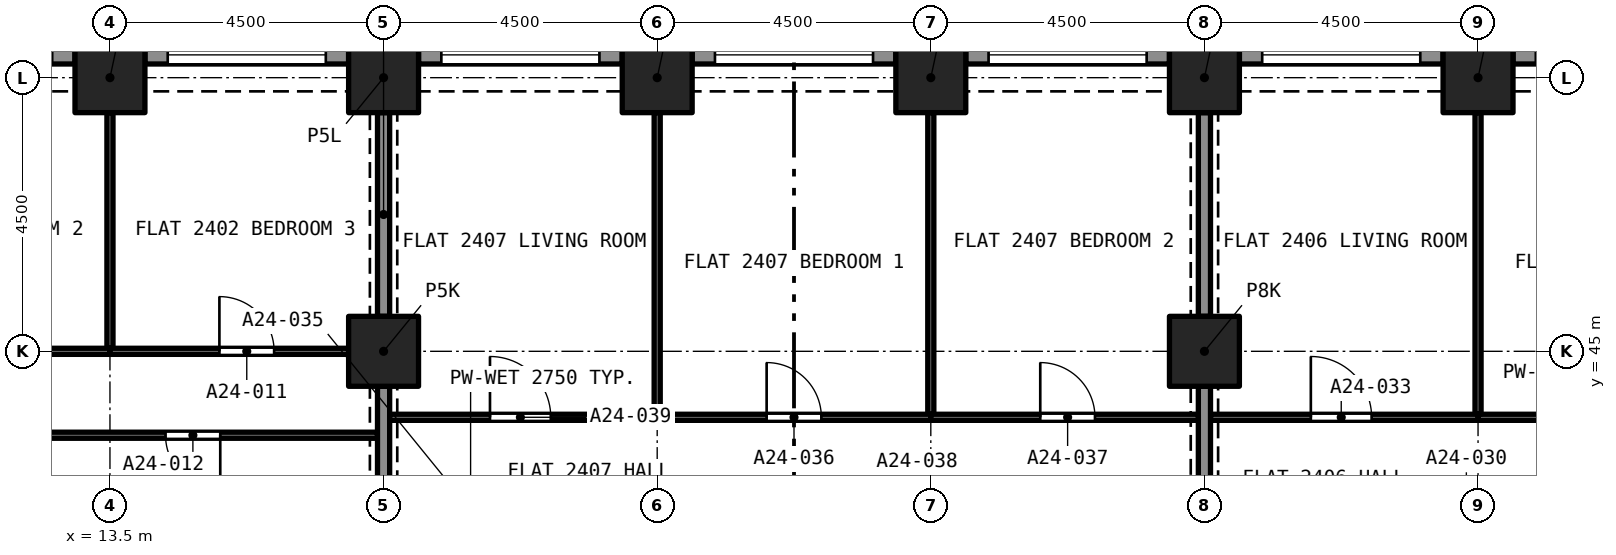
"""IFC4 building model, lengths in metres.
Left out: names, types, materials, properties, quantities, classifications, styles, units other than length and angle.
Written with IfcOpenShell. Run it as: python <this file> out.ifc"""

import sys

from ifc_helpers import new_model, si_unit, direction, frame, frame_2d, origin, origin_2d, place, context, subcontext, project, spatial, rectangle, extrude, element, fill, save


model = new_model("IFC4")
c1 = context("Model", 3, precision=1e-05, world=origin(), true_north=direction((0.0, 1.0)))
c2 = subcontext(c1, "Body", "Model", "MODEL_VIEW")
j1 = project(units=[si_unit("LENGTHUNIT", "METRE"), si_unit("PLANEANGLEUNIT", "RADIAN")], contexts=[c1])
p1 = place(None, origin())
s1 = spatial("IfcSite", under=j1, at=p1, CompositionType="ELEMENT")
p2 = place(p1, origin())
s2 = spatial("IfcBuilding", under=s1, at=p2, CompositionType="ELEMENT")
p3 = place(p2, frame((0.0, 0.0, 89.6)))
s3 = spatial("IfcBuildingStorey", under=s2, at=p3, CompositionType="ELEMENT", Elevation=89.6)
for number, where, z_axis, x_axis in (
    (1, (18.0, 45.0, 0.0), (0.0, 0.0, 1.0), (1.0, 0.0, 0.0)),
    (2, (31.5, 45.0, 0.0), (0.0, 0.0, 1.0), (1.0, 0.0, 0.0)),
    (3, (13.5, 49.5, 0.0), (0.0, 0.0, 1.0), (1.0, 0.0, 0.0)),
    (4, (18.0, 49.5, 0.0), (0.0, 0.0, 1.0), (1.0, 0.0, 0.0)),
    (5, (22.5, 49.5, 0.0), (0.0, 0.0, 1.0), (1.0, 0.0, 0.0)),
    (6, (27.0, 49.5, 0.0), (0.0, 0.0, 1.0), (1.0, 0.0, 0.0)),
    (7, (31.5, 49.5, 0.0), (0.0, 0.0, 1.0), (1.0, 0.0, 0.0)),
    (8, (36.0, 49.5, 0.0), (0.0, 0.0, 1.0), (1.0, 0.0, 0.0)),
):
    element("IfcColumn", number, at=place(p3, frame(where, z_axis=z_axis, x_axis=x_axis)), inside=s3, PredefinedType="COLUMN", context=c2, shape_type="SweptSolid", body=[
        extrude(rectangle(XDim=1.15, YDim=1.15, at=origin_2d()), origin(), (0.0, 0.0, 1.0), 3.2),
    ])
p4 = place(p3, frame((36.575, 49.875, 0.0), z_axis=(0.0, 0.0, 1.0), x_axis=(1.0, 0.0, 0.0)))
e9 = element("IfcWall", 9, at=p4, inside=s3, PredefinedType="SOLIDWALL", context=c2, shape_type="SweptSolid", body=[
    extrude(rectangle(XDim=3.35, YDim=0.3, at=frame_2d((1.675, 0.0))), origin(), (0.0, 0.0, 1.0), 3.2),
])
p5 = place(p4, frame((0.375, 0.0, 0.45)))
e10 = element("IfcOpeningElement", 10, at=p5, cuts=e9, PredefinedType="OPENING", context=c2, shape_type="SweptSolid", body=[
    extrude(rectangle(XDim=2.6, YDim=1.95, at=frame_2d((1.3, 0.975))), frame((0.0, 0.16, 0.0), z_axis=(0.0, -1.0, 0.0), x_axis=(1.0, 0.0, 0.0)), (0.0, 0.0, 1.0), 0.32),
])
p6 = place(p3, frame((32.075, 49.875, 0.0), z_axis=(0.0, 0.0, 1.0), x_axis=(1.0, 0.0, 0.0)))
e11 = element("IfcWall", 11, at=p6, inside=s3, PredefinedType="SOLIDWALL", context=c2, shape_type="SweptSolid", body=[
    extrude(rectangle(XDim=3.35, YDim=0.3, at=frame_2d((1.675, 0.0))), origin(), (0.0, 0.0, 1.0), 3.2),
])
p7 = place(p6, frame((0.375, 0.0, 0.45)))
e12 = element("IfcOpeningElement", 12, at=p7, cuts=e11, PredefinedType="OPENING", context=c2, shape_type="SweptSolid", body=[
    extrude(rectangle(XDim=2.6, YDim=1.95, at=frame_2d((1.3, 0.975))), frame((0.0, 0.16, 0.0), z_axis=(0.0, -1.0, 0.0), x_axis=(1.0, 0.0, 0.0)), (0.0, 0.0, 1.0), 0.32),
])
p8 = place(p3, frame((27.575, 49.875, 0.0), z_axis=(0.0, 0.0, 1.0), x_axis=(1.0, 0.0, 0.0)))
e13 = element("IfcWall", 13, at=p8, inside=s3, PredefinedType="SOLIDWALL", context=c2, shape_type="SweptSolid", body=[
    extrude(rectangle(XDim=3.35, YDim=0.3, at=frame_2d((1.675, 0.0))), origin(), (0.0, 0.0, 1.0), 3.2),
])
p9 = place(p8, frame((0.375, 0.0, 0.45)))
e14 = element("IfcOpeningElement", 14, at=p9, cuts=e13, PredefinedType="OPENING", context=c2, shape_type="SweptSolid", body=[
    extrude(rectangle(XDim=2.6, YDim=1.95, at=frame_2d((1.3, 0.975))), frame((0.0, 0.16, 0.0), z_axis=(0.0, -1.0, 0.0), x_axis=(1.0, 0.0, 0.0)), (0.0, 0.0, 1.0), 0.32),
])
p10 = place(p3, frame((23.075, 49.875, 0.0), z_axis=(0.0, 0.0, 1.0), x_axis=(1.0, 0.0, 0.0)))
e15 = element("IfcWall", 15, at=p10, inside=s3, PredefinedType="SOLIDWALL", context=c2, shape_type="SweptSolid", body=[
    extrude(rectangle(XDim=3.35, YDim=0.3, at=frame_2d((1.675, 0.0))), origin(), (0.0, 0.0, 1.0), 3.2),
])
p11 = place(p10, frame((0.375, 0.0, 0.45)))
e16 = element("IfcOpeningElement", 16, at=p11, cuts=e15, PredefinedType="OPENING", context=c2, shape_type="SweptSolid", body=[
    extrude(rectangle(XDim=2.6, YDim=1.95, at=frame_2d((1.3, 0.975))), frame((0.0, 0.16, 0.0), z_axis=(0.0, -1.0, 0.0), x_axis=(1.0, 0.0, 0.0)), (0.0, 0.0, 1.0), 0.32),
])
p12 = place(p3, frame((18.575, 49.875, 0.0), z_axis=(0.0, 0.0, 1.0), x_axis=(1.0, 0.0, 0.0)))
e17 = element("IfcWall", 17, at=p12, inside=s3, PredefinedType="SOLIDWALL", context=c2, shape_type="SweptSolid", body=[
    extrude(rectangle(XDim=3.35, YDim=0.3, at=frame_2d((1.675, 0.0))), origin(), (0.0, 0.0, 1.0), 3.2),
])
p13 = place(p12, frame((0.375, 0.0, 0.45)))
e18 = element("IfcOpeningElement", 18, at=p13, cuts=e17, PredefinedType="OPENING", context=c2, shape_type="SweptSolid", body=[
    extrude(rectangle(XDim=2.6, YDim=1.95, at=frame_2d((1.3, 0.975))), frame((0.0, 0.16, 0.0), z_axis=(0.0, -1.0, 0.0), x_axis=(1.0, 0.0, 0.0)), (0.0, 0.0, 1.0), 0.32),
])
p14 = place(p3, frame((14.075, 49.875, 0.0), z_axis=(0.0, 0.0, 1.0), x_axis=(1.0, 0.0, 0.0)))
e19 = element("IfcWall", 19, at=p14, inside=s3, PredefinedType="SOLIDWALL", context=c2, shape_type="SweptSolid", body=[
    extrude(rectangle(XDim=3.35, YDim=0.3, at=frame_2d((1.675, 0.0))), origin(), (0.0, 0.0, 1.0), 3.2),
])
p15 = place(p14, frame((0.375, 0.0, 0.45)))
e20 = element("IfcOpeningElement", 20, at=p15, cuts=e19, PredefinedType="OPENING", context=c2, shape_type="SweptSolid", body=[
    extrude(rectangle(XDim=2.6, YDim=1.95, at=frame_2d((1.3, 0.975))), frame((0.0, 0.16, 0.0), z_axis=(0.0, -1.0, 0.0), x_axis=(1.0, 0.0, 0.0)), (0.0, 0.0, 1.0), 0.32),
])
p16 = place(p3, frame((9.575, 49.875, 0.0), z_axis=(0.0, 0.0, 1.0), x_axis=(1.0, 0.0, 0.0)))
e21 = element("IfcWall", 21, at=p16, inside=s3, PredefinedType="SOLIDWALL", context=c2, shape_type="SweptSolid", body=[
    extrude(rectangle(XDim=3.35, YDim=0.3, at=frame_2d((1.675, 0.0))), origin(), (0.0, 0.0, 1.0), 3.2),
])
p17 = place(p16, frame((0.375, 0.0, 0.45)))
e22 = element("IfcOpeningElement", 22, at=p17, cuts=e21, PredefinedType="OPENING", context=c2, shape_type="SweptSolid", body=[
    extrude(rectangle(XDim=2.6, YDim=1.95, at=frame_2d((1.3, 0.975))), frame((0.0, 0.16, 0.0), z_axis=(0.0, -1.0, 0.0), x_axis=(1.0, 0.0, 0.0)), (0.0, 0.0, 1.0), 0.32),
])
p18 = place(p3, frame((13.5, 45.05, 0.0), z_axis=(0.0, 0.0, 1.0), x_axis=(0.0, 1.0, 0.0)))
e23 = element("IfcWall", 23, at=p18, inside=s3, PredefinedType="PARTITIONING", context=c2, shape_type="SweptSolid", body=[
    extrude(rectangle(XDim=3.875, YDim=0.1, at=frame_2d((1.938, 0.0))), origin(), (0.0, 0.0, 1.0), 2.9),
])
p19 = place(p3, frame((9.0, 45.0, 0.0), z_axis=(0.0, 0.0, 1.0), x_axis=(1.0, 0.0, 0.0)))
e24 = element("IfcWall", 24, at=p19, inside=s3, PredefinedType="PARTITIONING", context=c2, shape_type="SweptSolid", body=[
    extrude(rectangle(XDim=4.5, YDim=0.1, at=frame_2d((2.25, 0.0))), origin(), (0.0, 0.0, 1.0), 2.9),
])
p20 = place(p19, frame((1.8, 0.0, 0.0)))
e25 = element("IfcOpeningElement", 25, at=p20, cuts=e24, PredefinedType="OPENING", context=c2, shape_type="SweptSolid", body=[
    extrude(rectangle(XDim=0.9, YDim=2.1, at=frame_2d((0.45, 1.05))), frame((0.0, 0.06, 0.0), z_axis=(0.0, -1.0, 0.0), x_axis=(1.0, 0.0, 0.0)), (0.0, 0.0, 1.0), 0.12),
])
p21 = place(p3, frame((13.5, 45.0, 0.0), z_axis=(0.0, 0.0, 1.0), x_axis=(1.0, 0.0, 0.0)))
e26 = element("IfcWall", 26, at=p21, inside=s3, PredefinedType="PARTITIONING", context=c2, shape_type="SweptSolid", body=[
    extrude(rectangle(XDim=3.925, YDim=0.1, at=frame_2d((1.962, 0.0))), origin(), (0.0, 0.0, 1.0), 2.9),
])
p22 = place(p21, frame((1.8, 0.0, 0.0)))
e27 = element("IfcOpeningElement", 27, at=p22, cuts=e26, PredefinedType="OPENING", context=c2, shape_type="SweptSolid", body=[
    extrude(rectangle(XDim=0.9, YDim=2.1, at=frame_2d((0.45, 1.05))), frame((0.0, 0.06, 0.0), z_axis=(0.0, -1.0, 0.0), x_axis=(1.0, 0.0, 0.0)), (0.0, 0.0, 1.0), 0.12),
])
p23 = place(p3, frame((18.0, 45.575, 0.0), z_axis=(0.0, 0.0, 1.0), x_axis=(0.0, 1.0, 0.0)))
e28 = element("IfcWall", 28, at=p23, inside=s3, PredefinedType="PARTITIONING", context=c2, shape_type="SweptSolid", body=[
    extrude(rectangle(XDim=3.35, YDim=0.2, at=frame_2d((1.675, 0.0))), origin(), (0.0, 0.0, 1.0), 2.38),
])
p24 = place(p3, frame((17.9, 43.62, 0.0), z_axis=(0.0, 0.0, 1.0), x_axis=(-1.0, 0.0, 0.0)))
e29 = element("IfcWall", 29, at=p24, inside=s3, PredefinedType="PARTITIONING", context=c2, shape_type="SweptSolid", body=[
    extrude(rectangle(XDim=6.172, YDim=0.1, at=frame_2d((3.086, 0.0))), origin(), (0.0, 0.0, 1.0), 2.9),
])
p25 = place(p24, frame((2.586, 0.0, 0.0)))
e30 = element("IfcOpeningElement", 30, at=p25, cuts=e29, PredefinedType="OPENING", context=c2, shape_type="SweptSolid", body=[
    extrude(rectangle(XDim=0.9, YDim=2.1, at=frame_2d((0.45, 1.05))), frame((0.0, 0.06, 0.0), z_axis=(0.0, -1.0, 0.0), x_axis=(1.0, 0.0, 0.0)), (0.0, 0.0, 1.0), 0.12),
])
p26 = place(p3, frame((18.0, 41.075, 0.0), z_axis=(0.0, 0.0, 1.0), x_axis=(0.0, 1.0, 0.0)))
e31 = element("IfcWall", 31, at=p26, inside=s3, PredefinedType="PARTITIONING", context=c2, shape_type="SweptSolid", body=[
    extrude(rectangle(XDim=3.35, YDim=0.2, at=frame_2d((1.675, 0.0))), origin(), (0.0, 0.0, 1.0), 2.38),
])
p27 = place(p3, frame((36.0, 43.915, 0.0), z_axis=(0.0, 0.0, 1.0), x_axis=(1.0, 0.0, 0.0)))
e32 = element("IfcWall", 32, at=p27, inside=s3, PredefinedType="PARTITIONING", context=c2, shape_type="SweptSolid", body=[
    extrude(rectangle(XDim=4.4, YDim=0.1, at=frame_2d((2.2, 0.0))), origin(), (0.0, 0.0, 1.0), 2.9),
])
p28 = place(p27, frame((1.8, 0.0, 0.0)))
e33 = element("IfcOpeningElement", 33, at=p28, cuts=e32, PredefinedType="OPENING", context=c2, shape_type="SweptSolid", body=[
    extrude(rectangle(XDim=0.9, YDim=2.1, at=frame_2d((0.45, 1.05))), frame((0.0, 0.06, 0.0), z_axis=(0.0, -1.0, 0.0), x_axis=(1.0, 0.0, 0.0)), (0.0, 0.0, 1.0), 0.12),
])
p29 = place(p3, frame((36.0, 43.965, 0.0), z_axis=(0.0, 0.0, 1.0), x_axis=(0.0, 1.0, 0.0)))
e34 = element("IfcWall", 34, at=p29, inside=s3, PredefinedType="PARTITIONING", context=c2, shape_type="SweptSolid", body=[
    extrude(rectangle(XDim=4.96, YDim=0.1, at=frame_2d((2.48, 0.0))), origin(), (0.0, 0.0, 1.0), 2.9),
])
p30 = place(p3, frame((31.6, 43.915, 0.0), z_axis=(0.0, 0.0, 1.0), x_axis=(1.0, 0.0, 0.0)))
e35 = element("IfcWall", 35, at=p30, inside=s3, PredefinedType="PARTITIONING", context=c2, shape_type="SweptSolid", body=[
    extrude(rectangle(XDim=4.4, YDim=0.1, at=frame_2d((2.2, 0.0))), origin(), (0.0, 0.0, 1.0), 2.9),
])
p31 = place(p30, frame((1.65, 0.0, 0.0)))
e36 = element("IfcOpeningElement", 36, at=p31, cuts=e35, PredefinedType="OPENING", context=c2, shape_type="SweptSolid", body=[
    extrude(rectangle(XDim=1.0, YDim=2.1, at=frame_2d((0.5, 1.05))), frame((0.0, 0.06, 0.0), z_axis=(0.0, -1.0, 0.0), x_axis=(1.0, 0.0, 0.0)), (0.0, 0.0, 1.0), 0.12),
])
for number, where, z_axis, x_axis in (
    (37, (31.5, 41.075, 0.0), (0.0, 0.0, 1.0), (0.0, 1.0, 0.0)),
    (38, (31.5, 45.575, 0.0), (0.0, 0.0, 1.0), (0.0, 1.0, 0.0)),
):
    element("IfcWall", number, at=place(p3, frame(where, z_axis=z_axis, x_axis=x_axis)), inside=s3, PredefinedType="PARTITIONING", context=c2, shape_type="SweptSolid", body=[
        extrude(rectangle(XDim=3.35, YDim=0.2, at=frame_2d((1.675, 0.0))), origin(), (0.0, 0.0, 1.0), 2.38),
    ])
p32 = place(p3, frame((27.0, 43.965, 0.0), z_axis=(0.0, 0.0, 1.0), x_axis=(0.0, 1.0, 0.0)))
e39 = element("IfcWall", 39, at=p32, inside=s3, PredefinedType="PARTITIONING", context=c2, shape_type="SweptSolid", body=[
    extrude(rectangle(XDim=4.96, YDim=0.1, at=frame_2d((2.48, 0.0))), origin(), (0.0, 0.0, 1.0), 2.75),
])
p33 = place(p3, frame((22.5, 43.915, 0.0), z_axis=(0.0, 0.0, 1.0), x_axis=(1.0, 0.0, 0.0)))
e40 = element("IfcWall", 40, at=p33, inside=s3, PredefinedType="PARTITIONING", context=c2, shape_type="SweptSolid", body=[
    extrude(rectangle(XDim=4.5, YDim=0.1, at=frame_2d((2.25, 0.0))), origin(), (0.0, 0.0, 1.0), 2.75),
])
p34 = place(p33, frame((1.8, 0.0, 0.0)))
e41 = element("IfcOpeningElement", 41, at=p34, cuts=e40, PredefinedType="OPENING", context=c2, shape_type="SweptSolid", body=[
    extrude(rectangle(XDim=0.9, YDim=2.1, at=frame_2d((0.45, 1.05))), frame((0.0, 0.06, 0.0), z_axis=(0.0, -1.0, 0.0), x_axis=(1.0, 0.0, 0.0)), (0.0, 0.0, 1.0), 0.12),
])
p35 = place(p3, frame((22.5, 43.965, 0.0), z_axis=(0.0, 0.0, 1.0), x_axis=(0.0, 1.0, 0.0)))
e42 = element("IfcWall", 42, at=p35, inside=s3, PredefinedType="PARTITIONING", context=c2, shape_type="SweptSolid", body=[
    extrude(rectangle(XDim=4.96, YDim=0.1, at=frame_2d((2.48, 0.0))), origin(), (0.0, 0.0, 1.0), 2.75),
])
p36 = place(p3, frame((27.0, 43.915, 0.0), z_axis=(0.0, 0.0, 1.0), x_axis=(1.0, 0.0, 0.0)))
e43 = element("IfcWall", 43, at=p36, inside=s3, PredefinedType="PARTITIONING", context=c2, shape_type="SweptSolid", body=[
    extrude(rectangle(XDim=4.4, YDim=0.1, at=frame_2d((2.2, 0.0))), origin(), (0.0, 0.0, 1.0), 2.75),
])
p37 = place(p36, frame((1.8, 0.0, 0.0)))
e44 = element("IfcOpeningElement", 44, at=p37, cuts=e43, PredefinedType="OPENING", context=c2, shape_type="SweptSolid", body=[
    extrude(rectangle(XDim=0.9, YDim=2.1, at=frame_2d((0.45, 1.05))), frame((0.0, 0.06, 0.0), z_axis=(0.0, -1.0, 0.0), x_axis=(1.0, 0.0, 0.0)), (0.0, 0.0, 1.0), 0.12),
])
p38 = place(p3, frame((18.1, 43.915, 0.0), z_axis=(0.0, 0.0, 1.0), x_axis=(1.0, 0.0, 0.0)))
e45 = element("IfcWall", 45, at=p38, inside=s3, PredefinedType="PARTITIONING", context=c2, shape_type="SweptSolid", body=[
    extrude(rectangle(XDim=4.4, YDim=0.1, at=frame_2d((2.2, 0.0))), origin(), (0.0, 0.0, 1.0), 2.75),
])
p39 = place(p38, frame((1.65, 0.0, 0.0)))
e46 = element("IfcOpeningElement", 46, at=p39, cuts=e45, PredefinedType="OPENING", context=c2, shape_type="SweptSolid", body=[
    extrude(rectangle(XDim=1.0, YDim=2.1, at=frame_2d((0.5, 1.05))), frame((0.0, 0.06, 0.0), z_axis=(0.0, -1.0, 0.0), x_axis=(1.0, 0.0, 0.0)), (0.0, 0.0, 1.0), 0.12),
])
p40 = place(p7, origin())
e47 = element("IfcWindow", 47, at=p40, inside=s3, PartitioningType="SINGLE_PANEL", PredefinedType="WINDOW", context=c2, shape_type="SweptSolid", body=[
    extrude(rectangle(XDim=2.6, YDim=1.95, at=frame_2d((1.3, 0.975))), frame((0.0, 0.03, 0.0), z_axis=(0.0, -1.0, 0.0), x_axis=(1.0, 0.0, 0.0)), (0.0, 0.0, 1.0), 0.06),
])
fill(e12, e47)
p41 = place(p9, origin())
e48 = element("IfcWindow", 48, at=p41, inside=s3, PartitioningType="SINGLE_PANEL", PredefinedType="WINDOW", context=c2, shape_type="SweptSolid", body=[
    extrude(rectangle(XDim=2.6, YDim=1.95, at=frame_2d((1.3, 0.975))), frame((0.0, 0.03, 0.0), z_axis=(0.0, -1.0, 0.0), x_axis=(1.0, 0.0, 0.0)), (0.0, 0.0, 1.0), 0.06),
])
fill(e14, e48)
p42 = place(p11, origin())
e49 = element("IfcWindow", 49, at=p42, inside=s3, PartitioningType="SINGLE_PANEL", PredefinedType="WINDOW", context=c2, shape_type="SweptSolid", body=[
    extrude(rectangle(XDim=2.6, YDim=1.95, at=frame_2d((1.3, 0.975))), frame((0.0, 0.03, 0.0), z_axis=(0.0, -1.0, 0.0), x_axis=(1.0, 0.0, 0.0)), (0.0, 0.0, 1.0), 0.06),
])
fill(e16, e49)
p43 = place(p13, origin())
e50 = element("IfcWindow", 50, at=p43, inside=s3, PartitioningType="SINGLE_PANEL", PredefinedType="WINDOW", context=c2, shape_type="SweptSolid", body=[
    extrude(rectangle(XDim=2.6, YDim=1.95, at=frame_2d((1.3, 0.975))), frame((0.0, 0.03, 0.0), z_axis=(0.0, -1.0, 0.0), x_axis=(1.0, 0.0, 0.0)), (0.0, 0.0, 1.0), 0.06),
])
fill(e18, e50)
p44 = place(p15, origin())
e51 = element("IfcWindow", 51, at=p44, inside=s3, PartitioningType="SINGLE_PANEL", PredefinedType="WINDOW", context=c2, shape_type="SweptSolid", body=[
    extrude(rectangle(XDim=2.6, YDim=1.95, at=frame_2d((1.3, 0.975))), frame((0.0, 0.03, 0.0), z_axis=(0.0, -1.0, 0.0), x_axis=(1.0, 0.0, 0.0)), (0.0, 0.0, 1.0), 0.06),
])
fill(e20, e51)
p45 = place(p22, origin())
e52 = element("IfcDoor", 52, at=p45, inside=s3, OperationType="SINGLE_SWING_RIGHT", PredefinedType="DOOR", context=c2, shape_type="SweptSolid", body=[
    extrude(rectangle(XDim=0.9, YDim=2.1, at=frame_2d((0.45, 1.05))), frame((0.0, 0.025, 0.0), z_axis=(0.0, -1.0, 0.0), x_axis=(1.0, 0.0, 0.0)), (0.0, 0.0, 1.0), 0.05),
])
fill(e27, e52)
p46 = place(p25, origin())
e53 = element("IfcDoor", 53, at=p46, inside=s3, OperationType="SINGLE_SWING_LEFT", PredefinedType="DOOR", context=c2, shape_type="SweptSolid", body=[
    extrude(rectangle(XDim=0.9, YDim=2.1, at=frame_2d((0.45, 1.05))), frame((0.0, 0.025, 0.0), z_axis=(0.0, -1.0, 0.0), x_axis=(1.0, 0.0, 0.0)), (0.0, 0.0, 1.0), 0.05),
])
fill(e30, e53)
p47 = place(p31, origin())
e54 = element("IfcDoor", 54, at=p47, inside=s3, OperationType="SINGLE_SWING_LEFT", PredefinedType="DOOR", context=c2, shape_type="SweptSolid", body=[
    extrude(rectangle(XDim=1.0, YDim=2.1, at=frame_2d((0.5, 1.05))), frame((0.0, 0.025, 0.0), z_axis=(0.0, -1.0, 0.0), x_axis=(1.0, 0.0, 0.0)), (0.0, 0.0, 1.0), 0.05),
])
fill(e36, e54)
p48 = place(p34, origin())
e55 = element("IfcDoor", 55, at=p48, inside=s3, OperationType="SINGLE_SWING_LEFT", PredefinedType="DOOR", context=c2, shape_type="SweptSolid", body=[
    extrude(rectangle(XDim=0.9, YDim=2.1, at=frame_2d((0.45, 1.05))), frame((0.0, 0.025, 0.0), z_axis=(0.0, -1.0, 0.0), x_axis=(1.0, 0.0, 0.0)), (0.0, 0.0, 1.0), 0.05),
])
fill(e41, e55)
p49 = place(p37, origin())
e56 = element("IfcDoor", 56, at=p49, inside=s3, OperationType="SINGLE_SWING_RIGHT", PredefinedType="DOOR", context=c2, shape_type="SweptSolid", body=[
    extrude(rectangle(XDim=0.9, YDim=2.1, at=frame_2d((0.45, 1.05))), frame((0.0, 0.025, 0.0), z_axis=(0.0, -1.0, 0.0), x_axis=(1.0, 0.0, 0.0)), (0.0, 0.0, 1.0), 0.05),
])
fill(e44, e56)
p50 = place(p39, origin())
e57 = element("IfcDoor", 57, at=p50, inside=s3, OperationType="SINGLE_SWING_LEFT", PredefinedType="DOOR", context=c2, shape_type="SweptSolid", body=[
    extrude(rectangle(XDim=1.0, YDim=2.1, at=frame_2d((0.5, 1.05))), frame((0.0, 0.025, 0.0), z_axis=(0.0, -1.0, 0.0), x_axis=(1.0, 0.0, 0.0)), (0.0, 0.0, 1.0), 0.05),
])
fill(e46, e57)
save(model, sys.argv[1])
